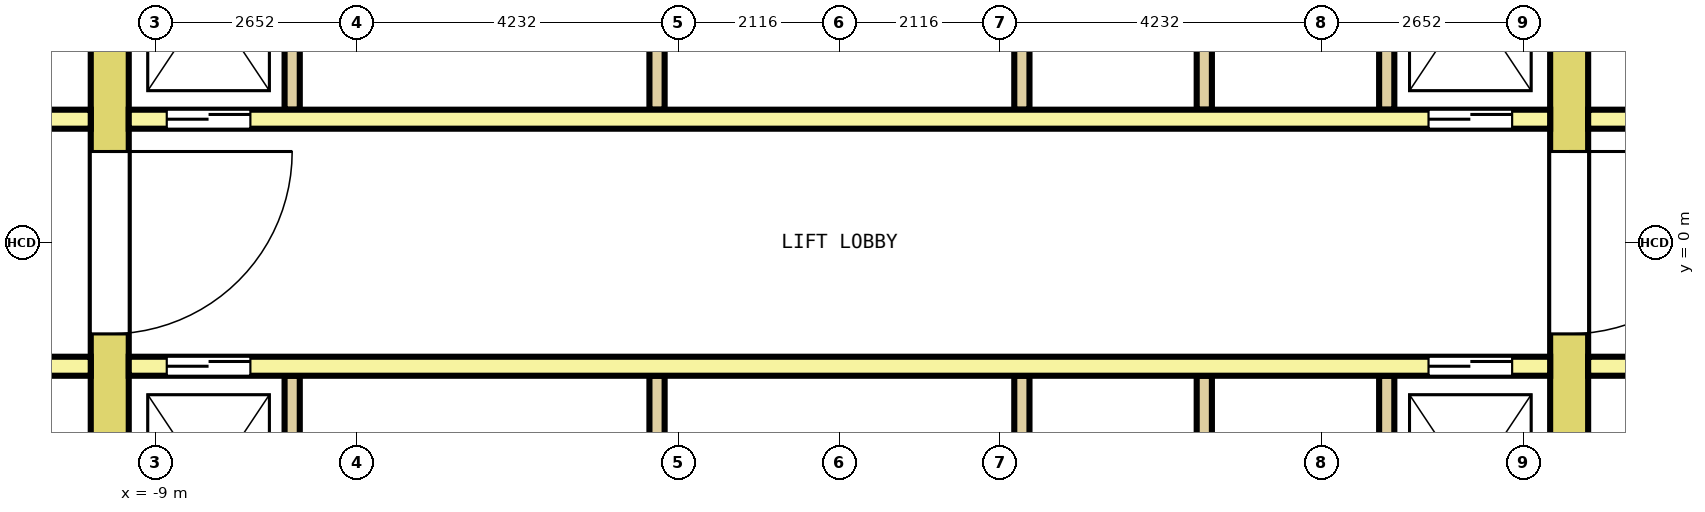
"""IFC4 building model, lengths in metres.
Left out: names, types, materials, properties, quantities, classifications, styles, units other than length and angle.
Written with IfcOpenShell. Run it as: python <this file> out.ifc"""

import sys

from ifc_helpers import new_model, si_unit, direction, frame, frame_2d, origin, place, context, subcontext, project, spatial, rectangle, extrude, element, fill, save


model = new_model("IFC4")
c1 = context("Model", 3, precision=1e-05, world=origin(), true_north=direction((0.0, 1.0)))
c2 = subcontext(c1, "Body", "Model", "MODEL_VIEW")
j1 = project(units=[si_unit("LENGTHUNIT", "METRE"), si_unit("PLANEANGLEUNIT", "RADIAN")], contexts=[c1])
p1 = place(None, origin())
s1 = spatial("IfcSite", under=j1, at=p1, CompositionType="ELEMENT")
p2 = place(p1, origin())
s2 = spatial("IfcBuilding", under=s1, at=p2, CompositionType="ELEMENT")
p3 = place(p2, frame((0.0, 0.0, 36.6)))
s3 = spatial("IfcBuildingStorey", under=s2, at=p3, CompositionType="ELEMENT", Elevation=36.6)
p4 = place(p3, frame((-9.6, -7.7, 0.0), z_axis=(0.0, 0.0, 1.0), x_axis=(0.0, 1.0, 0.0)))
e1 = element("IfcWall", 1, at=p4, inside=s3, PredefinedType="SHEAR", context=c2, shape_type="SweptSolid", body=[
    extrude(rectangle(XDim=15.4, YDim=0.5, at=frame_2d((7.7, 0.0))), origin(), (0.0, 0.0, 1.0), 4.1),
])
p5 = place(p4, frame((6.5, 0.0, 0.0)))
e2 = element("IfcOpeningElement", 2, at=p5, cuts=e1, PredefinedType="OPENING", context=c2, shape_type="SweptSolid", body=[
    extrude(rectangle(XDim=2.4, YDim=2.1, at=frame_2d((1.2, 1.05))), frame((0.0, 0.26, 0.0), z_axis=(0.0, -1.0, 0.0), x_axis=(1.0, 0.0, 0.0)), (0.0, 0.0, 1.0), 0.52),
])
p6 = place(p4, frame((13.4, 0.0, 0.0)))
e3 = element("IfcOpeningElement", 3, at=p6, cuts=e1, PredefinedType="OPENING", context=c2, shape_type="SweptSolid", body=[
    extrude(rectangle(XDim=1.2, YDim=2.1, at=frame_2d((0.6, 1.05))), frame((0.0, 0.26, 0.0), z_axis=(0.0, -1.0, 0.0), x_axis=(1.0, 0.0, 0.0)), (0.0, 0.0, 1.0), 0.52),
])
p7 = place(p4, frame((0.8, 0.0, 0.0)))
e4 = element("IfcOpeningElement", 4, at=p7, cuts=e1, PredefinedType="OPENING", context=c2, shape_type="SweptSolid", body=[
    extrude(rectangle(XDim=1.2, YDim=2.1, at=frame_2d((0.6, 1.05))), frame((0.0, 0.26, 0.0), z_axis=(0.0, -1.0, 0.0), x_axis=(1.0, 0.0, 0.0)), (0.0, 0.0, 1.0), 0.52),
])
p8 = place(p3, frame((9.6, -7.7, 0.0), z_axis=(0.0, 0.0, 1.0), x_axis=(0.0, 1.0, 0.0)))
e5 = element("IfcWall", 5, at=p8, inside=s3, PredefinedType="SHEAR", context=c2, shape_type="SweptSolid", body=[
    extrude(rectangle(XDim=15.4, YDim=0.5, at=frame_2d((7.7, 0.0))), origin(), (0.0, 0.0, 1.0), 4.1),
])
p9 = place(p8, frame((6.5, 0.0, 0.0)))
e6 = element("IfcOpeningElement", 6, at=p9, cuts=e5, PredefinedType="OPENING", context=c2, shape_type="SweptSolid", body=[
    extrude(rectangle(XDim=2.4, YDim=2.1, at=frame_2d((1.2, 1.05))), frame((0.0, 0.26, 0.0), z_axis=(0.0, -1.0, 0.0), x_axis=(1.0, 0.0, 0.0)), (0.0, 0.0, 1.0), 0.52),
])
p10 = place(p8, frame((13.4, 0.0, 0.0)))
e7 = element("IfcOpeningElement", 7, at=p10, cuts=e5, PredefinedType="OPENING", context=c2, shape_type="SweptSolid", body=[
    extrude(rectangle(XDim=1.2, YDim=2.1, at=frame_2d((0.6, 1.05))), frame((0.0, 0.26, 0.0), z_axis=(0.0, -1.0, 0.0), x_axis=(1.0, 0.0, 0.0)), (0.0, 0.0, 1.0), 0.52),
])
p11 = place(p8, frame((0.9, 0.0, 0.0)))
e8 = element("IfcOpeningElement", 8, at=p11, cuts=e5, PredefinedType="OPENING", context=c2, shape_type="SweptSolid", body=[
    extrude(rectangle(XDim=1.0, YDim=2.1, at=frame_2d((0.5, 1.05))), frame((0.0, 0.26, 0.0), z_axis=(0.0, -1.0, 0.0), x_axis=(1.0, 0.0, 0.0)), (0.0, 0.0, 1.0), 0.52),
])
p12 = place(p3, frame((-12.75, 1.625, 0.0), z_axis=(0.0, 0.0, 1.0), x_axis=(1.0, 0.0, 0.0)))
e9 = element("IfcWall", 9, at=p12, inside=s3, PredefinedType="SOLIDWALL", context=c2, shape_type="SweptSolid", body=[
    extrude(rectangle(XDim=2.9, YDim=0.25, at=frame_2d((1.45, 0.0))), origin(), (0.0, 0.0, 1.0), 4.1),
])
p13 = place(p12, frame((0.9, 0.0, 0.0)))
e10 = element("IfcOpeningElement", 10, at=p13, cuts=e9, PredefinedType="OPENING", context=c2, shape_type="SweptSolid", body=[
    extrude(rectangle(XDim=1.1, YDim=2.1, at=frame_2d((0.55, 1.05))), frame((0.0, 0.135, 0.0), z_axis=(0.0, -1.0, 0.0), x_axis=(1.0, 0.0, 0.0)), (0.0, 0.0, 1.0), 0.27),
])
p14 = place(p3, frame((-9.35, 1.625, 0.0), z_axis=(0.0, 0.0, 1.0), x_axis=(1.0, 0.0, 0.0)))
e11 = element("IfcWall", 11, at=p14, inside=s3, PredefinedType="SOLIDWALL", context=c2, shape_type="SweptSolid", body=[
    extrude(rectangle(XDim=18.7, YDim=0.25, at=frame_2d((9.35, 0.0))), origin(), (0.0, 0.0, 1.0), 4.1),
])
p15 = place(p14, frame((0.5, 0.0, 0.0)))
e12 = element("IfcOpeningElement", 12, at=p15, cuts=e11, PredefinedType="OPENING", context=c2, shape_type="SweptSolid", body=[
    extrude(rectangle(XDim=1.1, YDim=2.1, at=frame_2d((0.55, 1.05))), frame((0.0, 0.135, 0.0), z_axis=(0.0, -1.0, 0.0), x_axis=(1.0, 0.0, 0.0)), (0.0, 0.0, 1.0), 0.27),
])
p16 = place(p14, frame((17.1, 0.0, 0.0)))
e13 = element("IfcOpeningElement", 13, at=p16, cuts=e11, PredefinedType="OPENING", context=c2, shape_type="SweptSolid", body=[
    extrude(rectangle(XDim=1.1, YDim=2.1, at=frame_2d((0.55, 1.05))), frame((0.0, 0.135, 0.0), z_axis=(0.0, -1.0, 0.0), x_axis=(1.0, 0.0, 0.0)), (0.0, 0.0, 1.0), 0.27),
])
p17 = place(p3, frame((9.85, 1.625, 0.0), z_axis=(0.0, 0.0, 1.0), x_axis=(1.0, 0.0, 0.0)))
e14 = element("IfcWall", 14, at=p17, inside=s3, PredefinedType="SOLIDWALL", context=c2, shape_type="SweptSolid", body=[
    extrude(rectangle(XDim=2.9, YDim=0.25, at=frame_2d((1.45, 0.0))), origin(), (0.0, 0.0, 1.0), 4.1),
])
p18 = place(p17, frame((0.9, 0.0, 0.0)))
e15 = element("IfcOpeningElement", 15, at=p18, cuts=e14, PredefinedType="OPENING", context=c2, shape_type="SweptSolid", body=[
    extrude(rectangle(XDim=1.1, YDim=2.1, at=frame_2d((0.55, 1.05))), frame((0.0, 0.135, 0.0), z_axis=(0.0, -1.0, 0.0), x_axis=(1.0, 0.0, 0.0)), (0.0, 0.0, 1.0), 0.27),
])
for number, where, z_axis, x_axis in (
    (16, (-7.2, 1.75, 0.0), (0.0, 0.0, 1.0), (0.0, 1.0, 0.0)),
    (17, (-2.4, 1.75, 0.0), (0.0, 0.0, 1.0), (0.0, 1.0, 0.0)),
    (18, (2.4, 1.75, 0.0), (0.0, 0.0, 1.0), (0.0, 1.0, 0.0)),
    (19, (4.8, 1.75, 0.0), (0.0, 0.0, 1.0), (0.0, 1.0, 0.0)),
    (20, (7.2, 1.75, 0.0), (0.0, 0.0, 1.0), (0.0, 1.0, 0.0)),
):
    element("IfcWall", number, at=place(p3, frame(where, z_axis=z_axis, x_axis=x_axis)), inside=s3, PredefinedType="SOLIDWALL", context=c2, shape_type="SweptSolid", body=[
        extrude(rectangle(XDim=2.9, YDim=0.2, at=frame_2d((1.45, 0.0))), origin(), (0.0, 0.0, 1.0), 4.1),
    ])
p19 = place(p3, frame((-12.75, -1.625, 0.0), z_axis=(0.0, 0.0, 1.0), x_axis=(1.0, 0.0, 0.0)))
e21 = element("IfcWall", 21, at=p19, inside=s3, PredefinedType="SOLIDWALL", context=c2, shape_type="SweptSolid", body=[
    extrude(rectangle(XDim=2.9, YDim=0.25, at=frame_2d((1.45, 0.0))), origin(), (0.0, 0.0, 1.0), 4.1),
])
p20 = place(p19, frame((0.9, 0.0, 0.0)))
e22 = element("IfcOpeningElement", 22, at=p20, cuts=e21, PredefinedType="OPENING", context=c2, shape_type="SweptSolid", body=[
    extrude(rectangle(XDim=1.1, YDim=2.1, at=frame_2d((0.55, 1.05))), frame((0.0, 0.135, 0.0), z_axis=(0.0, -1.0, 0.0), x_axis=(1.0, 0.0, 0.0)), (0.0, 0.0, 1.0), 0.27),
])
p21 = place(p3, frame((-9.35, -1.625, 0.0), z_axis=(0.0, 0.0, 1.0), x_axis=(1.0, 0.0, 0.0)))
e23 = element("IfcWall", 23, at=p21, inside=s3, PredefinedType="SOLIDWALL", context=c2, shape_type="SweptSolid", body=[
    extrude(rectangle(XDim=18.7, YDim=0.25, at=frame_2d((9.35, 0.0))), origin(), (0.0, 0.0, 1.0), 4.1),
])
p22 = place(p21, frame((0.5, 0.0, 0.0)))
e24 = element("IfcOpeningElement", 24, at=p22, cuts=e23, PredefinedType="OPENING", context=c2, shape_type="SweptSolid", body=[
    extrude(rectangle(XDim=1.1, YDim=2.1, at=frame_2d((0.55, 1.05))), frame((0.0, 0.135, 0.0), z_axis=(0.0, -1.0, 0.0), x_axis=(1.0, 0.0, 0.0)), (0.0, 0.0, 1.0), 0.27),
])
p23 = place(p21, frame((17.1, 0.0, 0.0)))
e25 = element("IfcOpeningElement", 25, at=p23, cuts=e23, PredefinedType="OPENING", context=c2, shape_type="SweptSolid", body=[
    extrude(rectangle(XDim=1.1, YDim=2.1, at=frame_2d((0.55, 1.05))), frame((0.0, 0.135, 0.0), z_axis=(0.0, -1.0, 0.0), x_axis=(1.0, 0.0, 0.0)), (0.0, 0.0, 1.0), 0.27),
])
p24 = place(p3, frame((9.85, -1.625, 0.0), z_axis=(0.0, 0.0, 1.0), x_axis=(1.0, 0.0, 0.0)))
e26 = element("IfcWall", 26, at=p24, inside=s3, PredefinedType="SOLIDWALL", context=c2, shape_type="SweptSolid", body=[
    extrude(rectangle(XDim=2.9, YDim=0.25, at=frame_2d((1.45, 0.0))), origin(), (0.0, 0.0, 1.0), 4.1),
])
p25 = place(p24, frame((0.9, 0.0, 0.0)))
e27 = element("IfcOpeningElement", 27, at=p25, cuts=e26, PredefinedType="OPENING", context=c2, shape_type="SweptSolid", body=[
    extrude(rectangle(XDim=1.1, YDim=2.1, at=frame_2d((0.55, 1.05))), frame((0.0, 0.135, 0.0), z_axis=(0.0, -1.0, 0.0), x_axis=(1.0, 0.0, 0.0)), (0.0, 0.0, 1.0), 0.27),
])
for number, where, z_axis, x_axis in (
    (28, (-7.2, -4.65, 0.0), (0.0, 0.0, 1.0), (0.0, 1.0, 0.0)),
    (29, (-2.4, -4.65, 0.0), (0.0, 0.0, 1.0), (0.0, 1.0, 0.0)),
    (30, (2.4, -4.65, 0.0), (0.0, 0.0, 1.0), (0.0, 1.0, 0.0)),
    (31, (4.8, -4.65, 0.0), (0.0, 0.0, 1.0), (0.0, 1.0, 0.0)),
    (32, (7.2, -4.65, 0.0), (0.0, 0.0, 1.0), (0.0, 1.0, 0.0)),
):
    element("IfcWall", number, at=place(p3, frame(where, z_axis=z_axis, x_axis=x_axis)), inside=s3, PredefinedType="SOLIDWALL", context=c2, shape_type="SweptSolid", body=[
        extrude(rectangle(XDim=2.9, YDim=0.2, at=frame_2d((1.45, 0.0))), origin(), (0.0, 0.0, 1.0), 4.1),
    ])
p26 = place(p15, origin())
e33 = element("IfcDoor", 33, at=p26, inside=s3, OperationType="DOUBLE_DOOR_SLIDING", PredefinedType="DOOR", context=c2, shape_type="SweptSolid", body=[
    extrude(rectangle(XDim=1.1, YDim=2.1, at=frame_2d((0.55, 1.05))), frame((0.0, 0.075, 0.0), z_axis=(0.0, -1.0, 0.0), x_axis=(1.0, 0.0, 0.0)), (0.0, 0.0, 1.0), 0.15),
])
fill(e12, e33)
p27 = place(p16, origin())
e34 = element("IfcDoor", 34, at=p27, inside=s3, OperationType="DOUBLE_DOOR_SLIDING", PredefinedType="DOOR", context=c2, shape_type="SweptSolid", body=[
    extrude(rectangle(XDim=1.1, YDim=2.1, at=frame_2d((0.55, 1.05))), frame((0.0, 0.075, 0.0), z_axis=(0.0, -1.0, 0.0), x_axis=(1.0, 0.0, 0.0)), (0.0, 0.0, 1.0), 0.15),
])
fill(e13, e34)
p28 = place(p22, origin())
e35 = element("IfcDoor", 35, at=p28, inside=s3, OperationType="DOUBLE_DOOR_SLIDING", PredefinedType="DOOR", context=c2, shape_type="SweptSolid", body=[
    extrude(rectangle(XDim=1.1, YDim=2.1, at=frame_2d((0.55, 1.05))), frame((0.0, 0.075, 0.0), z_axis=(0.0, -1.0, 0.0), x_axis=(1.0, 0.0, 0.0)), (0.0, 0.0, 1.0), 0.15),
])
fill(e24, e35)
p29 = place(p23, origin())
e36 = element("IfcDoor", 36, at=p29, inside=s3, OperationType="DOUBLE_DOOR_SLIDING", PredefinedType="DOOR", context=c2, shape_type="SweptSolid", body=[
    extrude(rectangle(XDim=1.1, YDim=2.1, at=frame_2d((0.55, 1.05))), frame((0.0, 0.075, 0.0), z_axis=(0.0, -1.0, 0.0), x_axis=(1.0, 0.0, 0.0)), (0.0, 0.0, 1.0), 0.15),
])
fill(e25, e36)
p30 = place(p5, origin())
e37 = element("IfcDoor", 37, at=p30, inside=s3, OperationType="DOUBLE_DOOR_SINGLE_SWING", PredefinedType="DOOR", context=c2, shape_type="SweptSolid", body=[
    extrude(rectangle(XDim=2.4, YDim=2.1, at=frame_2d((1.2, 1.05))), frame((0.0, 0.2, 0.0), z_axis=(0.0, -1.0, 0.0), x_axis=(1.0, 0.0, 0.0)), (0.0, 0.0, 1.0), 0.4),
])
fill(e2, e37)
p31 = place(p9, origin())
e38 = element("IfcDoor", 38, at=p31, inside=s3, OperationType="DOUBLE_DOOR_SINGLE_SWING", PredefinedType="DOOR", context=c2, shape_type="SweptSolid", body=[
    extrude(rectangle(XDim=2.4, YDim=2.1, at=frame_2d((1.2, 1.05))), frame((0.0, 0.2, 0.0), z_axis=(0.0, -1.0, 0.0), x_axis=(1.0, 0.0, 0.0)), (0.0, 0.0, 1.0), 0.4),
])
fill(e6, e38)
save(model, sys.argv[1])
